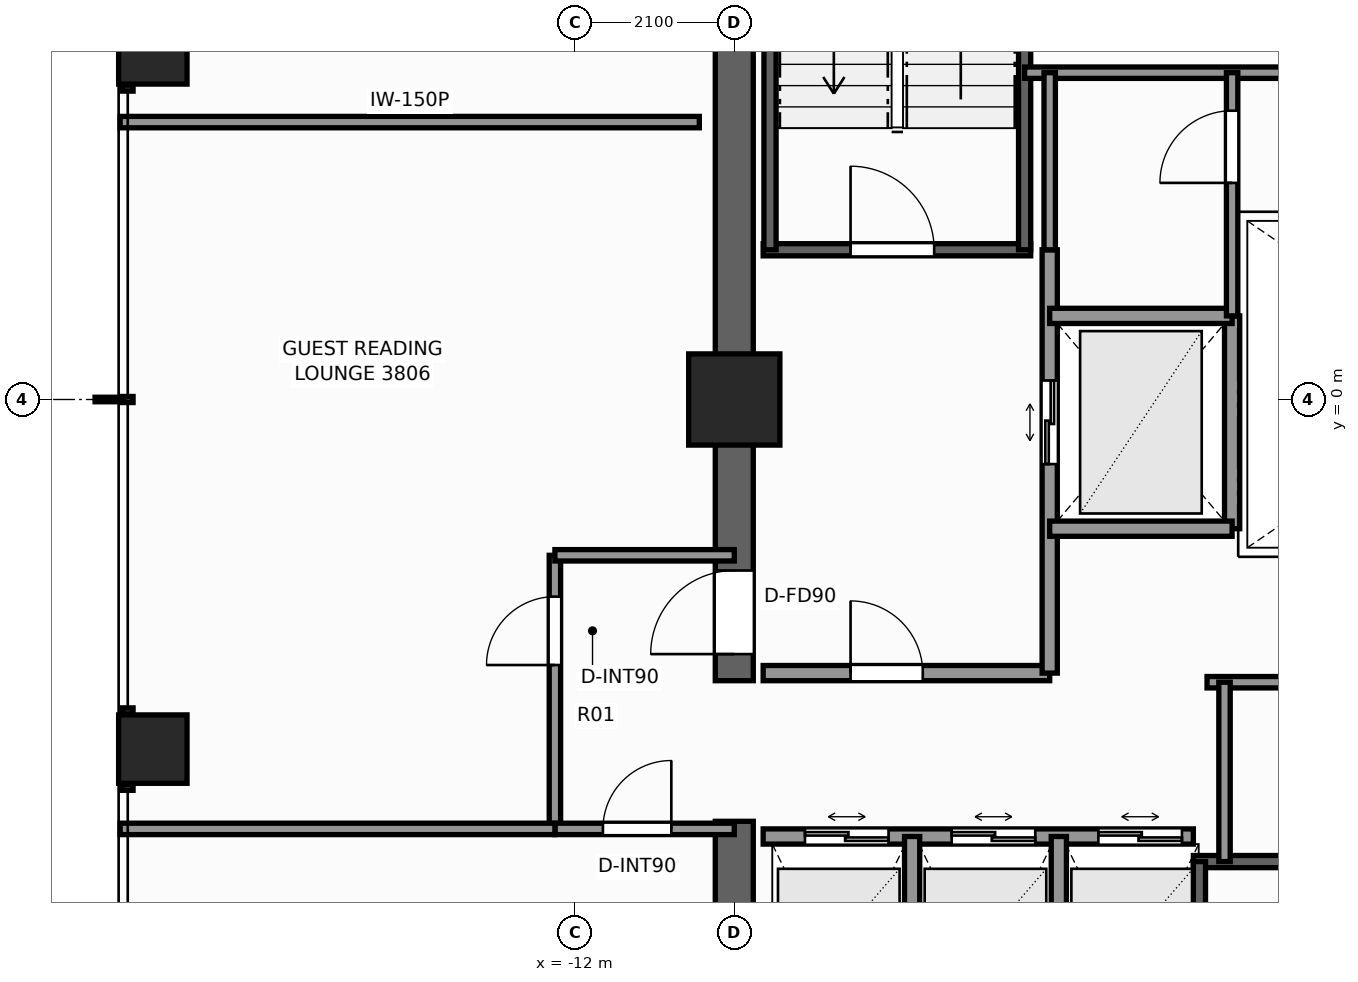
"""IFC4 building model, lengths in metres.
Left out: names, types, materials, properties, quantities, classifications, styles, units other than length and angle.
Written with IfcOpenShell. Run it as: python <this file> out.ifc"""

import sys

from ifc_helpers import new_model, si_unit, direction, frame, frame_2d, origin, origin_2d, place, context, subcontext, project, spatial, rectangle, extrude, element, fill, save


model = new_model("IFC4")
c1 = context("Model", 3, precision=1e-05, world=origin(), true_north=direction((0.0, 1.0)))
c2 = subcontext(c1, "Body", "Model", "MODEL_VIEW")
j1 = project(units=[si_unit("LENGTHUNIT", "METRE"), si_unit("PLANEANGLEUNIT", "RADIAN")], contexts=[c1])
p1 = place(None, origin())
s1 = spatial("IfcSite", under=j1, at=p1, CompositionType="ELEMENT")
p2 = place(p1, origin())
s2 = spatial("IfcBuilding", under=s1, at=p2, CompositionType="ELEMENT")
p3 = place(p2, frame((0.0, 0.0, 131.6)))
s3 = spatial("IfcBuildingStorey", under=s2, at=p3, CompositionType="ELEMENT", Elevation=131.6)
p4 = place(p3, frame((-9.9, -9.65, 0.0), z_axis=(0.0, 0.0, 1.0), x_axis=(0.0, 1.0, 0.0)))
e1 = element("IfcWall", 1, at=p4, inside=s3, PredefinedType="SHEAR", context=c2, shape_type="SweptSolid", body=[
    extrude(rectangle(XDim=4.1, YDim=0.5, at=frame_2d((2.05, 0.0))), origin(), (0.0, 0.0, 1.0), 3.3),
])
p5 = place(p3, frame((-9.9, -3.7, 0.0), z_axis=(0.0, 0.0, 1.0), x_axis=(0.0, 1.0, 0.0)))
e2 = element("IfcWall", 2, at=p5, inside=s3, PredefinedType="SHEAR", context=c2, shape_type="SweptSolid", body=[
    extrude(rectangle(XDim=13.35, YDim=0.5, at=frame_2d((6.675, 0.0))), origin(), (0.0, 0.0, 1.0), 3.3),
])
p6 = place(p5, frame((0.35, 0.0, 0.0)))
e3 = element("IfcOpeningElement", 3, at=p6, cuts=e2, PredefinedType="OPENING", context=c2, shape_type="SweptSolid", body=[
    extrude(rectangle(XDim=1.1, YDim=2.2, at=frame_2d((0.55, 1.1))), frame((0.0, 0.26, 0.0), z_axis=(0.0, -1.0, 0.0), x_axis=(1.0, 0.0, 0.0)), (0.0, 0.0, 1.0), 0.52),
])
p7 = place(p3, frame((-9.9, 0.0, 0.0), z_axis=(0.0, 0.0, 1.0), x_axis=(1.0, 0.0, 0.0)))
e4 = element("IfcColumn", 4, at=p7, inside=s3, PredefinedType="COLUMN", context=c2, shape_type="SweptSolid", body=[
    extrude(rectangle(XDim=1.2, YDim=1.2, at=origin_2d()), origin(), (0.0, 0.0, 1.0), 3.3),
])
for number, where, z_axis, x_axis in (
    (5, (-17.55, -4.6, 0.0), (0.0, 0.0, 1.0), (1.0, 0.0, 0.0)),
    (6, (-17.55, 4.6, 0.0), (0.0, 0.0, 1.0), (1.0, 0.0, 0.0)),
):
    element("IfcColumn", number, at=place(p3, frame(where, z_axis=z_axis, x_axis=x_axis)), inside=s3, PredefinedType="COLUMN", context=c2, shape_type="SweptSolid", body=[
        extrude(rectangle(XDim=0.9, YDim=0.9, at=origin_2d()), origin(), (0.0, 0.0, 1.0), 3.3),
    ])
p8 = place(p3, frame((-9.52, 1.97, 0.0), z_axis=(0.0, 0.0, 1.0), x_axis=(1.0, 0.0, 0.0)))
e7 = element("IfcWall", 7, at=p8, inside=s3, PredefinedType="SHEAR", context=c2, shape_type="SweptSolid", body=[
    extrude(rectangle(XDim=3.52, YDim=0.16, at=frame_2d((1.76, 0.0))), origin(), (0.0, 0.0, 1.0), 3.3),
])
p9 = place(p8, frame((1.15, 0.0, 0.0)))
e8 = element("IfcOpeningElement", 8, at=p9, cuts=e7, PredefinedType="OPENING", context=c2, shape_type="SweptSolid", body=[
    extrude(rectangle(XDim=1.1, YDim=2.2, at=frame_2d((0.55, 1.1))), frame((0.0, 0.09, 0.0), z_axis=(0.0, -1.0, 0.0), x_axis=(1.0, 0.0, 0.0)), (0.0, 0.0, 1.0), 0.18),
])
for number, where, z_axis, x_axis in (
    (9, (-9.43, 1.97, 0.0), (0.0, 0.0, 1.0), (0.0, 1.0, 0.0)),
    (10, (-6.08, 1.97, 0.0), (0.0, 0.0, 1.0), (0.0, 1.0, 0.0)),
):
    element("IfcWall", number, at=place(p3, frame(where, z_axis=z_axis, x_axis=x_axis)), inside=s3, PredefinedType="SHEAR", context=c2, shape_type="SweptSolid", body=[
        extrude(rectangle(XDim=7.56, YDim=0.16, at=frame_2d((3.78, 0.0))), origin(), (0.0, 0.0, 1.0), 3.3),
    ])
p10 = place(p3, frame((-3.86, -6.08, 0.0), z_axis=(0.0, 0.0, 1.0), x_axis=(1.0, 0.0, 0.0)))
e11 = element("IfcWall", 11, at=p10, inside=s3, PredefinedType="SHEAR", context=c2, shape_type="SweptSolid", body=[
    extrude(rectangle(XDim=7.72, YDim=0.16, at=frame_2d((3.86, 0.0))), origin(), (0.0, 0.0, 1.0), 3.3),
])
p11 = place(p3, frame((-3.78, -9.43, 0.0), z_axis=(0.0, 0.0, 1.0), x_axis=(0.0, 1.0, 0.0)))
e12 = element("IfcWall", 12, at=p11, inside=s3, PredefinedType="SHEAR", context=c2, shape_type="SweptSolid", body=[
    extrude(rectangle(XDim=3.35, YDim=0.16, at=frame_2d((1.675, 0.0))), origin(), (0.0, 0.0, 1.0), 3.3),
])
p12 = place(p3, frame((-9.52, -3.6, 0.0), z_axis=(0.0, 0.0, 1.0), x_axis=(1.0, 0.0, 0.0)))
e13 = element("IfcWall", 13, at=p12, inside=s3, PredefinedType="SOLIDWALL", context=c2, shape_type="SweptSolid", body=[
    extrude(rectangle(XDim=3.77, YDim=0.2, at=frame_2d((1.885, 0.0))), origin(), (0.0, 0.0, 1.0), 3.1),
])
p13 = place(p12, frame((1.15, 0.0, 0.0)))
e14 = element("IfcOpeningElement", 14, at=p13, cuts=e13, PredefinedType="OPENING", context=c2, shape_type="SweptSolid", body=[
    extrude(rectangle(XDim=0.95, YDim=2.06, at=frame_2d((0.475, 1.03))), frame((0.0, 0.11, 0.0), z_axis=(0.0, -1.0, 0.0), x_axis=(1.0, 0.0, 0.0)), (0.0, 0.0, 1.0), 0.22),
])
p14 = place(p3, frame((-5.75, -3.6, 0.0), z_axis=(0.0, 0.0, 1.0), x_axis=(0.0, 1.0, 0.0)))
e15 = element("IfcWall", 15, at=p14, inside=s3, PredefinedType="SOLIDWALL", context=c2, shape_type="SweptSolid", body=[
    extrude(rectangle(XDim=5.57, YDim=0.2, at=frame_2d((2.785, 0.0))), origin(), (0.0, 0.0, 1.0), 2.735),
])
p15 = place(p14, frame((2.75, 0.0, 0.0)))
e16 = element("IfcOpeningElement", 16, at=p15, cuts=e15, PredefinedType="OPENING", context=c2, shape_type="SweptSolid", body=[
    extrude(rectangle(XDim=1.1, YDim=2.2, at=frame_2d((0.55, 1.1))), frame((0.0, 0.11, 0.0), z_axis=(0.0, -1.0, 0.0), x_axis=(1.0, 0.0, 0.0)), (0.0, 0.0, 1.0), 0.22),
])
p16 = place(p3, frame((-3.35, -1.7, 0.0), z_axis=(0.0, 0.0, 1.0), x_axis=(0.0, 1.0, 0.0)))
e17 = element("IfcWall", 17, at=p16, inside=s3, PredefinedType="SOLIDWALL", context=c2, shape_type="SweptSolid", body=[
    extrude(rectangle(XDim=2.8, YDim=0.2, at=frame_2d((1.4, 0.0))), origin(), (0.0, 0.0, 1.0), 2.735),
])
for number, where, z_axis, x_axis in (
    (18, (-5.75, -1.7, 0.0), (0.0, 0.0, 1.0), (1.0, 0.0, 0.0)),
    (19, (-5.75, 1.1, 0.0), (0.0, 0.0, 1.0), (1.0, 0.0, 0.0)),
):
    element("IfcWall", number, at=place(p3, frame(where, z_axis=z_axis, x_axis=x_axis)), inside=s3, PredefinedType="SOLIDWALL", context=c2, shape_type="SweptSolid", body=[
        extrude(rectangle(XDim=2.4, YDim=0.2, at=frame_2d((1.2, 0.0))), origin(), (0.0, 0.0, 1.0), 3.1),
    ])
p17 = place(p3, frame((-6.08, 4.3, 0.0), z_axis=(0.0, 0.0, 1.0), x_axis=(1.0, 0.0, 0.0)))
e20 = element("IfcWall", 20, at=p17, inside=s3, PredefinedType="PARTITIONING", context=c2, shape_type="SweptSolid", body=[
    extrude(rectangle(XDim=6.3, YDim=0.15, at=frame_2d((3.15, 0.0))), origin(), (0.0, 0.0, 1.0), 3.1),
])
p18 = place(p3, frame((-9.52, -5.75, 0.0), z_axis=(0.0, 0.0, 1.0), x_axis=(1.0, 0.0, 0.0)))
e21 = element("IfcWall", 21, at=p18, inside=s3, PredefinedType="SOLIDWALL", context=c2, shape_type="SweptSolid", body=[
    extrude(rectangle(XDim=5.66, YDim=0.2, at=frame_2d((2.83, 0.0))), origin(), (0.0, 0.0, 1.0), 3.1),
])
p19 = place(p18, frame((0.55, 0.0, 0.0)))
e22 = element("IfcOpeningElement", 22, at=p19, cuts=e21, PredefinedType="OPENING", context=c2, shape_type="SweptSolid", body=[
    extrude(rectangle(XDim=1.1, YDim=2.2, at=frame_2d((0.55, 1.1))), frame((0.0, 0.11, 0.0), z_axis=(0.0, -1.0, 0.0), x_axis=(1.0, 0.0, 0.0)), (0.0, 0.0, 1.0), 0.22),
])
p20 = place(p18, frame((2.48, 0.0, 0.0)))
e23 = element("IfcOpeningElement", 23, at=p20, cuts=e21, PredefinedType="OPENING", context=c2, shape_type="SweptSolid", body=[
    extrude(rectangle(XDim=1.1, YDim=2.2, at=frame_2d((0.55, 1.1))), frame((0.0, 0.11, 0.0), z_axis=(0.0, -1.0, 0.0), x_axis=(1.0, 0.0, 0.0)), (0.0, 0.0, 1.0), 0.22),
])
p21 = place(p18, frame((4.41, 0.0, 0.0)))
e24 = element("IfcOpeningElement", 24, at=p21, cuts=e21, PredefinedType="OPENING", context=c2, shape_type="SweptSolid", body=[
    extrude(rectangle(XDim=1.1, YDim=2.2, at=frame_2d((0.55, 1.1))), frame((0.0, 0.11, 0.0), z_axis=(0.0, -1.0, 0.0), x_axis=(1.0, 0.0, 0.0)), (0.0, 0.0, 1.0), 0.22),
])
for number, where, z_axis, x_axis in (
    (25, (-7.56, -9.52, 0.0), (0.0, 0.0, 1.0), (0.0, 1.0, 0.0)),
    (26, (-5.63, -9.52, 0.0), (0.0, 0.0, 1.0), (0.0, 1.0, 0.0)),
):
    element("IfcWall", number, at=place(p3, frame(where, z_axis=z_axis, x_axis=x_axis)), inside=s3, PredefinedType="SOLIDWALL", context=c2, shape_type="SweptSolid", body=[
        extrude(rectangle(XDim=3.77, YDim=0.2, at=frame_2d((1.885, 0.0))), origin(), (0.0, 0.0, 1.0), 3.1),
    ])
p22 = place(p3, frame((-3.68, -3.72, 0.0), z_axis=(0.0, 0.0, 1.0), x_axis=(1.0, 0.0, 0.0)))
e27 = element("IfcWall", 27, at=p22, inside=s3, PredefinedType="PARTITIONING", context=c2, shape_type="SweptSolid", body=[
    extrude(rectangle(XDim=7.36, YDim=0.15, at=frame_2d((3.68, 0.0))), origin(), (0.0, 0.0, 1.0), 3.1),
])
p23 = place(p3, frame((-3.45, -6.08, 0.0), z_axis=(0.0, 0.0, 1.0), x_axis=(0.0, 1.0, 0.0)))
e28 = element("IfcWall", 28, at=p23, inside=s3, PredefinedType="PARTITIONING", context=c2, shape_type="SweptSolid", body=[
    extrude(rectangle(XDim=2.36, YDim=0.15, at=frame_2d((1.18, 0.0))), origin(), (0.0, 0.0, 1.0), 3.1),
])
p24 = place(p3, frame((-3.35, 1.1, 0.0), z_axis=(0.0, 0.0, 1.0), x_axis=(0.0, 1.0, 0.0)))
e29 = element("IfcWall", 29, at=p24, inside=s3, PredefinedType="PARTITIONING", context=c2, shape_type="SweptSolid", body=[
    extrude(rectangle(XDim=3.2, YDim=0.15, at=frame_2d((1.6, 0.0))), origin(), (0.0, 0.0, 1.0), 2.735),
])
p25 = place(p24, frame((1.75, 0.0, 0.0)))
e30 = element("IfcOpeningElement", 30, at=p25, cuts=e29, PredefinedType="OPENING", context=c2, shape_type="SweptSolid", body=[
    extrude(rectangle(XDim=0.95, YDim=2.06, at=frame_2d((0.475, 1.03))), frame((0.0, 0.085, 0.0), z_axis=(0.0, -1.0, 0.0), x_axis=(1.0, 0.0, 0.0)), (0.0, 0.0, 1.0), 0.17),
])
p26 = place(p3, frame((-5.75, 1.97, 0.0), z_axis=(0.0, 0.0, 1.0), x_axis=(0.0, 1.0, 0.0)))
e31 = element("IfcWall", 31, at=p26, inside=s3, PredefinedType="PARTITIONING", context=c2, shape_type="SweptSolid", body=[
    extrude(rectangle(XDim=2.33, YDim=0.15, at=frame_2d((1.165, 0.0))), origin(), (0.0, 0.0, 1.0), 2.735),
])
p27 = place(p3, frame((-12.26, -5.65, 0.0), z_axis=(0.0, 0.0, 1.0), x_axis=(0.0, 1.0, 0.0)))
e32 = element("IfcWall", 32, at=p27, inside=s3, PredefinedType="PARTITIONING", context=c2, shape_type="SweptSolid", body=[
    extrude(rectangle(XDim=3.6, YDim=0.15, at=frame_2d((1.8, 0.0))), origin(), (0.0, 0.0, 1.0), 2.312),
])
p28 = place(p27, frame((2.156, 0.0, 0.0)))
e33 = element("IfcOpeningElement", 33, at=p28, cuts=e32, PredefinedType="OPENING", context=c2, shape_type="SweptSolid", body=[
    extrude(rectangle(XDim=0.9, YDim=2.06, at=frame_2d((0.45, 1.03))), frame((0.0, 0.085, 0.0), z_axis=(0.0, -1.0, 0.0), x_axis=(1.0, 0.0, 0.0)), (0.0, 0.0, 1.0), 0.17),
])
p29 = place(p3, frame((-12.26, -2.05, 0.0), z_axis=(0.0, 0.0, 1.0), x_axis=(1.0, 0.0, 0.0)))
e34 = element("IfcWall", 34, at=p29, inside=s3, PredefinedType="PARTITIONING", context=c2, shape_type="SweptSolid", body=[
    extrude(rectangle(XDim=2.36, YDim=0.15, at=frame_2d((1.18, 0.0))), origin(), (0.0, 0.0, 1.0), 3.1),
])
p30 = place(p3, frame((-12.26, -5.65, 0.0), z_axis=(0.0, 0.0, 1.0), x_axis=(1.0, 0.0, 0.0)))
e35 = element("IfcWall", 35, at=p30, inside=s3, PredefinedType="PARTITIONING", context=c2, shape_type="SweptSolid", body=[
    extrude(rectangle(XDim=2.36, YDim=0.15, at=frame_2d((1.18, 0.0))), origin(), (0.0, 0.0, 1.0), 3.1),
])
p31 = place(p30, frame((0.632, 0.0, 0.0)))
e36 = element("IfcOpeningElement", 36, at=p31, cuts=e35, PredefinedType="OPENING", context=c2, shape_type="SweptSolid", body=[
    extrude(rectangle(XDim=0.9, YDim=2.06, at=frame_2d((0.45, 1.03))), frame((0.0, 0.085, 0.0), z_axis=(0.0, -1.0, 0.0), x_axis=(1.0, 0.0, 0.0)), (0.0, 0.0, 1.0), 0.17),
])
p32 = place(p3, frame((-17.98, 3.65, 0.0), z_axis=(0.0, 0.0, 1.0), x_axis=(1.0, 0.0, 0.0)))
e37 = element("IfcWall", 37, at=p32, inside=s3, PredefinedType="PARTITIONING", context=c2, shape_type="SweptSolid", body=[
    extrude(rectangle(XDim=7.62, YDim=0.15, at=frame_2d((3.81, 0.0))), origin(), (0.0, 0.0, 1.0), 2.469),
])
p33 = place(p3, frame((-17.98, -5.65, 0.0), z_axis=(0.0, 0.0, 1.0), x_axis=(1.0, 0.0, 0.0)))
e38 = element("IfcWall", 38, at=p33, inside=s3, PredefinedType="PARTITIONING", context=c2, shape_type="SweptSolid", body=[
    extrude(rectangle(XDim=5.72, YDim=0.15, at=frame_2d((2.86, 0.0))), origin(), (0.0, 0.0, 1.0), 2.469),
])
p34 = place(p9, origin())
e39 = element("IfcDoor", 39, at=p34, inside=s3, OperationType="SINGLE_SWING_LEFT", PredefinedType="DOOR", context=c2, shape_type="SweptSolid", body=[
    extrude(rectangle(XDim=1.1, YDim=2.2, at=frame_2d((0.55, 1.1))), frame((0.0, 0.025, 0.0), z_axis=(0.0, -1.0, 0.0), x_axis=(1.0, 0.0, 0.0)), (0.0, 0.0, 1.0), 0.05),
])
fill(e8, e39)
p35 = place(p6, origin())
e40 = element("IfcDoor", 40, at=p35, inside=s3, OperationType="SINGLE_SWING_LEFT", PredefinedType="DOOR", context=c2, shape_type="SweptSolid", body=[
    extrude(rectangle(XDim=1.1, YDim=2.2, at=frame_2d((0.55, 1.1))), frame((0.0, 0.025, 0.0), z_axis=(0.0, -1.0, 0.0), x_axis=(1.0, 0.0, 0.0)), (0.0, 0.0, 1.0), 0.05),
])
fill(e3, e40)
p36 = place(p15, origin())
e41 = element("IfcDoor", 41, at=p36, inside=s3, OperationType="DOUBLE_DOOR_SLIDING", PredefinedType="DOOR", context=c2, shape_type="SweptSolid", body=[
    extrude(rectangle(XDim=1.1, YDim=2.2, at=frame_2d((0.55, 1.1))), frame((0.0, 0.025, 0.0), z_axis=(0.0, -1.0, 0.0), x_axis=(1.0, 0.0, 0.0)), (0.0, 0.0, 1.0), 0.05),
])
fill(e16, e41)
p37 = place(p19, origin())
e42 = element("IfcDoor", 42, at=p37, inside=s3, OperationType="DOUBLE_DOOR_SLIDING", PredefinedType="DOOR", context=c2, shape_type="SweptSolid", body=[
    extrude(rectangle(XDim=1.1, YDim=2.2, at=frame_2d((0.55, 1.1))), frame((0.0, 0.025, 0.0), z_axis=(0.0, -1.0, 0.0), x_axis=(1.0, 0.0, 0.0)), (0.0, 0.0, 1.0), 0.05),
])
fill(e22, e42)
p38 = place(p20, origin())
e43 = element("IfcDoor", 43, at=p38, inside=s3, OperationType="DOUBLE_DOOR_SLIDING", PredefinedType="DOOR", context=c2, shape_type="SweptSolid", body=[
    extrude(rectangle(XDim=1.1, YDim=2.2, at=frame_2d((0.55, 1.1))), frame((0.0, 0.025, 0.0), z_axis=(0.0, -1.0, 0.0), x_axis=(1.0, 0.0, 0.0)), (0.0, 0.0, 1.0), 0.05),
])
fill(e23, e43)
p39 = place(p21, origin())
e44 = element("IfcDoor", 44, at=p39, inside=s3, OperationType="DOUBLE_DOOR_SLIDING", PredefinedType="DOOR", context=c2, shape_type="SweptSolid", body=[
    extrude(rectangle(XDim=1.1, YDim=2.2, at=frame_2d((0.55, 1.1))), frame((0.0, 0.025, 0.0), z_axis=(0.0, -1.0, 0.0), x_axis=(1.0, 0.0, 0.0)), (0.0, 0.0, 1.0), 0.05),
])
fill(e24, e44)
p40 = place(p13, origin())
e45 = element("IfcDoor", 45, at=p40, inside=s3, OperationType="SINGLE_SWING_LEFT", PredefinedType="DOOR", context=c2, shape_type="SweptSolid", body=[
    extrude(rectangle(XDim=0.95, YDim=2.06, at=frame_2d((0.475, 1.03))), frame((0.0, 0.025, 0.0), z_axis=(0.0, -1.0, 0.0), x_axis=(1.0, 0.0, 0.0)), (0.0, 0.0, 1.0), 0.05),
])
fill(e14, e45)
p41 = place(p25, origin())
e46 = element("IfcDoor", 46, at=p41, inside=s3, OperationType="SINGLE_SWING_LEFT", PredefinedType="DOOR", context=c2, shape_type="SweptSolid", body=[
    extrude(rectangle(XDim=0.95, YDim=2.06, at=frame_2d((0.475, 1.03))), frame((0.0, 0.025, 0.0), z_axis=(0.0, -1.0, 0.0), x_axis=(1.0, 0.0, 0.0)), (0.0, 0.0, 1.0), 0.05),
])
fill(e30, e46)
p42 = place(p28, origin())
e47 = element("IfcDoor", 47, at=p42, inside=s3, OperationType="SINGLE_SWING_LEFT", PredefinedType="DOOR", context=c2, shape_type="SweptSolid", body=[
    extrude(rectangle(XDim=0.9, YDim=2.06, at=frame_2d((0.45, 1.03))), frame((0.0, 0.025, 0.0), z_axis=(0.0, -1.0, 0.0), x_axis=(1.0, 0.0, 0.0)), (0.0, 0.0, 1.0), 0.05),
])
fill(e33, e47)
p43 = place(p31, origin())
e48 = element("IfcDoor", 48, at=p43, inside=s3, OperationType="SINGLE_SWING_RIGHT", PredefinedType="DOOR", context=c2, shape_type="SweptSolid", body=[
    extrude(rectangle(XDim=0.9, YDim=2.06, at=frame_2d((0.45, 1.03))), frame((0.0, 0.025, 0.0), z_axis=(0.0, -1.0, 0.0), x_axis=(1.0, 0.0, 0.0)), (0.0, 0.0, 1.0), 0.05),
])
fill(e36, e48)
save(model, sys.argv[1])
